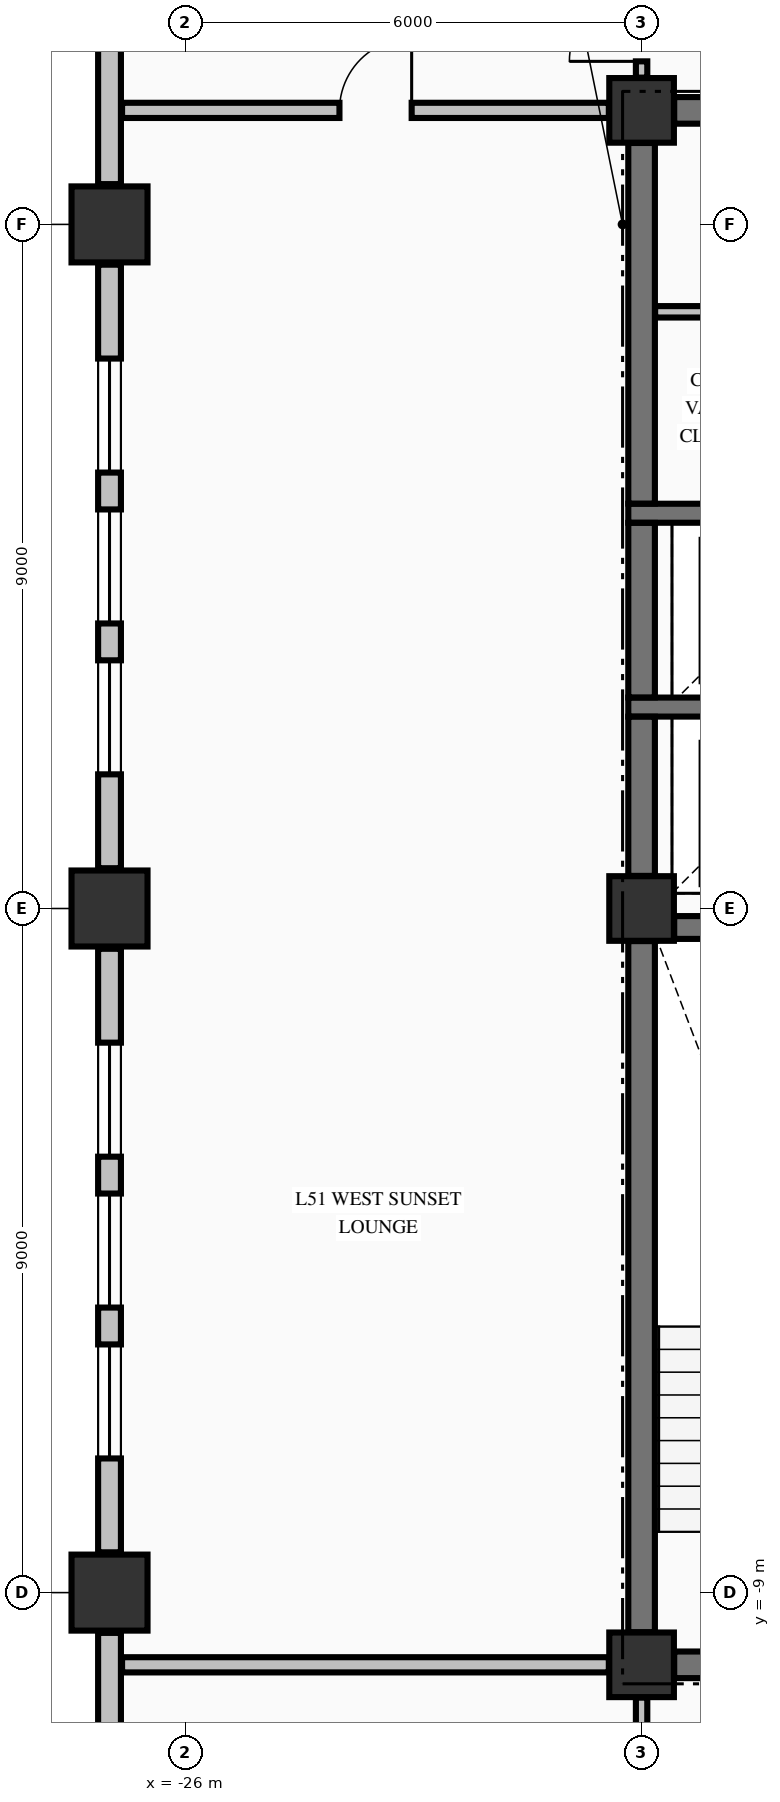
"""IFC4 building model, lengths in metres.
Left out: names, types, materials, properties, quantities, classifications, styles, units other than length and angle.
Written with IfcOpenShell. Run it as: python <this file> out.ifc"""

import sys

from ifc_helpers import new_model, si_unit, direction, frame, frame_2d, origin, origin_2d, place, context, subcontext, project, spatial, rectangle, extrude, element, fill, save


model = new_model("IFC4")
c1 = context("Model", 3, precision=1e-05, world=origin(), true_north=direction((0.0, 1.0)))
c2 = subcontext(c1, "Body", "Model", "MODEL_VIEW")
j1 = project(units=[si_unit("LENGTHUNIT", "METRE"), si_unit("PLANEANGLEUNIT", "RADIAN")], contexts=[c1])
p1 = place(None, origin())
s1 = spatial("IfcSite", under=j1, at=p1, CompositionType="ELEMENT")
p2 = place(p1, origin())
s2 = spatial("IfcBuilding", under=s1, at=p2, CompositionType="ELEMENT")
p3 = place(p2, frame((0.0, 0.0, 198.26)))
s3 = spatial("IfcBuildingStorey", under=s2, at=p3, CompositionType="ELEMENT", Elevation=198.26)
for number, where, z_axis, x_axis in (
    (1, (-27.0, -9.0, -0.25), (0.0, 0.0, 1.0), (1.0, 0.0, 0.0)),
    (2, (-27.0, 0.0, -0.25), (0.0, 0.0, 1.0), (1.0, 0.0, 0.0)),
    (3, (-27.0, 9.0, -0.25), (0.0, 0.0, 1.0), (1.0, 0.0, 0.0)),
):
    element("IfcColumn", number, at=place(p3, frame(where, z_axis=z_axis, x_axis=x_axis)), inside=s3, PredefinedType="COLUMN", context=c2, shape_type="SweptSolid", body=[
        extrude(rectangle(XDim=1.0, YDim=1.0, at=origin_2d()), origin(), (0.0, 0.0, 1.0), 3.4),
    ])
for number, where, z_axis, x_axis in (
    (4, (-20.0, -9.95, -0.25), (0.0, 0.0, 1.0), (1.0, 0.0, 0.0)),
    (5, (-20.0, 10.5, -0.25), (0.0, 0.0, 1.0), (1.0, 0.0, 0.0)),
    (6, (-20.0, 0.0, -0.25), (0.0, 0.0, 1.0), (1.0, 0.0, 0.0)),
):
    element("IfcColumn", number, at=place(p3, frame(where, z_axis=z_axis, x_axis=x_axis)), inside=s3, PredefinedType="COLUMN", context=c2, shape_type="SweptSolid", body=[
        extrude(rectangle(XDim=0.85, YDim=0.85, at=origin_2d()), origin(), (0.0, 0.0, 1.0), 3.4),
    ])
p4 = place(p3, frame((-27.0, -9.53, 0.0), z_axis=(0.0, 0.0, 1.0), x_axis=(0.0, -1.0, 0.0)))
e7 = element("IfcWall", 7, at=p4, inside=s3, PredefinedType="STANDARD", context=c2, shape_type="SweptSolid", body=[
    extrude(rectangle(XDim=9.44, YDim=0.3, at=frame_2d((4.72, 0.0))), origin(), (0.0, 0.0, 1.0), 2.542),
])
p5 = place(p3, frame((-27.0, -0.53, 0.0), z_axis=(0.0, 0.0, 1.0), x_axis=(0.0, -1.0, 0.0)))
e8 = element("IfcWall", 8, at=p5, inside=s3, PredefinedType="STANDARD", context=c2, shape_type="SweptSolid", body=[
    extrude(rectangle(XDim=7.94, YDim=0.3, at=frame_2d((3.97, 0.0))), origin(), (0.0, 0.0, 1.0), 2.542),
])
p6 = place(p5, frame((1.235, 0.0, 0.72)))
e9 = element("IfcOpeningElement", 9, at=p6, cuts=e8, PredefinedType="OPENING", context=c2, shape_type="SweptSolid", body=[
    extrude(rectangle(XDim=1.5, YDim=1.6, at=frame_2d((0.75, 0.8))), frame((0.0, 0.16, 0.0), z_axis=(0.0, -1.0, 0.0), x_axis=(1.0, 0.0, 0.0)), (0.0, 0.0, 1.0), 0.32),
])
p7 = place(p5, frame((3.22, 0.0, 0.72)))
e10 = element("IfcOpeningElement", 10, at=p7, cuts=e8, PredefinedType="OPENING", context=c2, shape_type="SweptSolid", body=[
    extrude(rectangle(XDim=1.5, YDim=1.6, at=frame_2d((0.75, 0.8))), frame((0.0, 0.16, 0.0), z_axis=(0.0, -1.0, 0.0), x_axis=(1.0, 0.0, 0.0)), (0.0, 0.0, 1.0), 0.32),
])
p8 = place(p5, frame((5.205, 0.0, 0.72)))
e11 = element("IfcOpeningElement", 11, at=p8, cuts=e8, PredefinedType="OPENING", context=c2, shape_type="SweptSolid", body=[
    extrude(rectangle(XDim=1.5, YDim=1.6, at=frame_2d((0.75, 0.8))), frame((0.0, 0.16, 0.0), z_axis=(0.0, -1.0, 0.0), x_axis=(1.0, 0.0, 0.0)), (0.0, 0.0, 1.0), 0.32),
])
p9 = place(p3, frame((-27.0, 8.47, 0.0), z_axis=(0.0, 0.0, 1.0), x_axis=(0.0, -1.0, 0.0)))
e12 = element("IfcWall", 12, at=p9, inside=s3, PredefinedType="STANDARD", context=c2, shape_type="SweptSolid", body=[
    extrude(rectangle(XDim=7.94, YDim=0.3, at=frame_2d((3.97, 0.0))), origin(), (0.0, 0.0, 1.0), 2.542),
])
p10 = place(p9, frame((1.235, 0.0, 0.72)))
e13 = element("IfcOpeningElement", 13, at=p10, cuts=e12, PredefinedType="OPENING", context=c2, shape_type="SweptSolid", body=[
    extrude(rectangle(XDim=1.5, YDim=1.6, at=frame_2d((0.75, 0.8))), frame((0.0, 0.16, 0.0), z_axis=(0.0, -1.0, 0.0), x_axis=(1.0, 0.0, 0.0)), (0.0, 0.0, 1.0), 0.32),
])
p11 = place(p9, frame((3.22, 0.0, 0.72)))
e14 = element("IfcOpeningElement", 14, at=p11, cuts=e12, PredefinedType="OPENING", context=c2, shape_type="SweptSolid", body=[
    extrude(rectangle(XDim=1.5, YDim=1.6, at=frame_2d((0.75, 0.8))), frame((0.0, 0.16, 0.0), z_axis=(0.0, -1.0, 0.0), x_axis=(1.0, 0.0, 0.0)), (0.0, 0.0, 1.0), 0.32),
])
p12 = place(p9, frame((5.205, 0.0, 0.72)))
e15 = element("IfcOpeningElement", 15, at=p12, cuts=e12, PredefinedType="OPENING", context=c2, shape_type="SweptSolid", body=[
    extrude(rectangle(XDim=1.5, YDim=1.6, at=frame_2d((0.75, 0.8))), frame((0.0, 0.16, 0.0), z_axis=(0.0, -1.0, 0.0), x_axis=(1.0, 0.0, 0.0)), (0.0, 0.0, 1.0), 0.32),
])
p13 = place(p3, frame((-27.0, 18.97, 0.0), z_axis=(0.0, 0.0, 1.0), x_axis=(0.0, -1.0, 0.0)))
e16 = element("IfcWall", 16, at=p13, inside=s3, PredefinedType="STANDARD", context=c2, shape_type="SweptSolid", body=[
    extrude(rectangle(XDim=9.44, YDim=0.3, at=frame_2d((4.72, 0.0))), origin(), (0.0, 0.0, 1.0), 2.542),
])
p14 = place(p3, frame((-19.571, -9.95, 0.0), z_axis=(0.0, 0.0, 1.0), x_axis=(1.0, 0.0, 0.0)))
e17 = element("IfcWall", 17, at=p14, inside=s3, PredefinedType="SHEAR", context=c2, shape_type="SweptSolid", body=[
    extrude(rectangle(XDim=4.871, YDim=0.35, at=frame_2d((2.436, 0.0))), origin(), (0.0, 0.0, 1.0), 3.15),
])
p15 = place(p14, frame((0.746, 0.0, 0.0)))
e18 = element("IfcOpeningElement", 18, at=p15, cuts=e17, PredefinedType="OPENING", context=c2, shape_type="SweptSolid", body=[
    extrude(rectangle(XDim=1.05, YDim=2.15, at=frame_2d((0.525, 1.075))), frame((0.0, 0.185, 0.0), z_axis=(0.0, -1.0, 0.0), x_axis=(1.0, 0.0, 0.0)), (0.0, 0.0, 1.0), 0.37),
])
p16 = place(p3, frame((-19.571, -0.25, 0.0), z_axis=(0.0, 0.0, 1.0), x_axis=(1.0, 0.0, 0.0)))
e19 = element("IfcWall", 19, at=p16, inside=s3, PredefinedType="SHEAR", context=c2, shape_type="SweptSolid", body=[
    extrude(rectangle(XDim=8.142, YDim=0.3, at=frame_2d((4.071, 0.0))), origin(), (0.0, 0.0, 1.0), 3.15),
])
p17 = place(p16, frame((5.871, 0.0, 0.0)))
e20 = element("IfcOpeningElement", 20, at=p17, cuts=e19, PredefinedType="OPENING", context=c2, shape_type="SweptSolid", body=[
    extrude(rectangle(XDim=1.1, YDim=2.15, at=frame_2d((0.55, 1.075))), frame((0.0, 0.16, 0.0), z_axis=(0.0, -1.0, 0.0), x_axis=(1.0, 0.0, 0.0)), (0.0, 0.0, 1.0), 0.32),
])
for number, where, z_axis, x_axis in (
    (21, (-20.175, 2.65, 0.0), (0.0, 0.0, 1.0), (1.0, 0.0, 0.0)),
    (22, (-20.175, 5.2, 0.0), (0.0, 0.0, 1.0), (1.0, 0.0, 0.0)),
):
    element("IfcWall", number, at=place(p3, frame(where, z_axis=z_axis, x_axis=x_axis)), inside=s3, PredefinedType="SOLIDWALL", context=c2, shape_type="SweptSolid", body=[
        extrude(rectangle(XDim=3.2, YDim=0.25, at=frame_2d((1.6, 0.0))), origin(), (0.0, 0.0, 1.0), 3.15),
    ])
p18 = place(p3, frame((-19.571, 10.5, 0.0), z_axis=(0.0, 0.0, 1.0), x_axis=(1.0, 0.0, 0.0)))
e23 = element("IfcWall", 23, at=p18, inside=s3, PredefinedType="SHEAR", context=c2, shape_type="SweptSolid", body=[
    extrude(rectangle(XDim=4.871, YDim=0.35, at=frame_2d((2.436, 0.0))), origin(), (0.0, 0.0, 1.0), 3.15),
])
p19 = place(p18, frame((3.121, 0.0, 0.0)))
e24 = element("IfcOpeningElement", 24, at=p19, cuts=e23, PredefinedType="OPENING", context=c2, shape_type="SweptSolid", body=[
    extrude(rectangle(XDim=1.1, YDim=2.15, at=frame_2d((0.55, 1.075))), frame((0.0, 0.185, 0.0), z_axis=(0.0, -1.0, 0.0), x_axis=(1.0, 0.0, 0.0)), (0.0, 0.0, 1.0), 0.37),
])
p20 = place(p3, frame((-26.835, -9.95, 0.0), z_axis=(0.0, 0.0, 1.0), x_axis=(1.0, 0.0, 0.0)))
e25 = element("IfcWall", 25, at=p20, inside=s3, PredefinedType="PARTITIONING", context=c2, shape_type="SweptSolid", body=[
    extrude(rectangle(XDim=6.404, YDim=0.2, at=frame_2d((3.202, 0.0))), origin(), (0.0, 0.0, 1.0), 3.15),
])
p21 = place(p3, frame((-19.822, 7.85, 0.0), z_axis=(0.0, 0.0, 1.0), x_axis=(1.0, 0.0, 0.0)))
e26 = element("IfcWall", 26, at=p21, inside=s3, PredefinedType="PARTITIONING", context=c2, shape_type="SweptSolid", body=[
    extrude(rectangle(XDim=2.822, YDim=0.15, at=frame_2d((1.411, 0.0))), origin(), (0.0, 0.0, 1.0), 3.15),
])
p22 = place(p3, frame((-26.835, 10.5, 0.0), z_axis=(0.0, 0.0, 1.0), x_axis=(1.0, 0.0, 0.0)))
e27 = element("IfcWall", 27, at=p22, inside=s3, PredefinedType="PARTITIONING", context=c2, shape_type="SweptSolid", body=[
    extrude(rectangle(XDim=6.404, YDim=0.2, at=frame_2d((3.202, 0.0))), origin(), (0.0, 0.0, 1.0), 3.15),
])
p23 = place(p22, frame((2.86, 0.0, 0.0)))
e28 = element("IfcOpeningElement", 28, at=p23, cuts=e27, PredefinedType="OPENING", context=c2, shape_type="SweptSolid", body=[
    extrude(rectangle(XDim=0.95, YDim=2.15, at=frame_2d((0.475, 1.075))), frame((0.0, 0.11, 0.0), z_axis=(0.0, -1.0, 0.0), x_axis=(1.0, 0.0, 0.0)), (0.0, 0.0, 1.0), 0.22),
])
p24 = place(p3, frame((-20.0, -9.521, 0.0), z_axis=(0.0, 0.0, 1.0), x_axis=(0.0, 1.0, 0.0)))
e29 = element("IfcWall", 29, at=p24, inside=s3, PredefinedType="SHEAR", context=c2, shape_type="SweptSolid", body=[
    extrude(rectangle(XDim=9.092, YDim=0.35, at=frame_2d((4.546, 0.0))), origin(), (0.0, 0.0, 1.0), 3.15),
])
p25 = place(p3, frame((-20.0, 0.429, 0.0), z_axis=(0.0, 0.0, 1.0), x_axis=(0.0, 1.0, 0.0)))
e30 = element("IfcWall", 30, at=p25, inside=s3, PredefinedType="SHEAR", context=c2, shape_type="SweptSolid", body=[
    extrude(rectangle(XDim=2.094, YDim=0.35, at=frame_2d((1.047, 0.0))), origin(), (0.0, 0.0, 1.0), 3.15),
])
p26 = place(p3, frame((-20.0, 2.777, 0.0), z_axis=(0.0, 0.0, 1.0), x_axis=(0.0, 1.0, 0.0)))
e31 = element("IfcWall", 31, at=p26, inside=s3, PredefinedType="SHEAR", context=c2, shape_type="SweptSolid", body=[
    extrude(rectangle(XDim=2.296, YDim=0.35, at=frame_2d((1.148, 0.0))), origin(), (0.0, 0.0, 1.0), 3.15),
])
p27 = place(p3, frame((-20.0, 5.327, 0.0), z_axis=(0.0, 0.0, 1.0), x_axis=(0.0, 1.0, 0.0)))
e32 = element("IfcWall", 32, at=p27, inside=s3, PredefinedType="SHEAR", context=c2, shape_type="SweptSolid", body=[
    extrude(rectangle(XDim=4.744, YDim=0.35, at=frame_2d((2.372, 0.0))), origin(), (0.0, 0.0, 1.0), 3.15),
])
p28 = place(p3, frame((-20.0, -12.447, 0.0), z_axis=(0.0, 0.0, 1.0), x_axis=(0.0, 1.0, 0.0)))
e33 = element("IfcWall", 33, at=p28, inside=s3, PredefinedType="PARTITIONING", context=c2, shape_type="SweptSolid", body=[
    extrude(rectangle(XDim=2.066, YDim=0.15, at=frame_2d((1.033, 0.0))), origin(), (0.0, 0.0, 1.0), 2.342),
])
p29 = place(p3, frame((-20.0, 10.931, 0.0), z_axis=(0.0, 0.0, 1.0), x_axis=(0.0, 1.0, 0.0)))
e34 = element("IfcWall", 34, at=p29, inside=s3, PredefinedType="PARTITIONING", context=c2, shape_type="SweptSolid", body=[
    extrude(rectangle(XDim=1.716, YDim=0.15, at=frame_2d((0.858, 0.0))), origin(), (0.0, 0.0, 1.0), 2.342),
])
p30 = place(p29, frame((0.214, 0.0, 0.0)))
e35 = element("IfcOpeningElement", 35, at=p30, cuts=e34, PredefinedType="OPENING", context=c2, shape_type="SweptSolid", body=[
    extrude(rectangle(XDim=0.95, YDim=2.15, at=frame_2d((0.475, 1.075))), frame((0.0, 0.085, 0.0), z_axis=(0.0, -1.0, 0.0), x_axis=(1.0, 0.0, 0.0)), (0.0, 0.0, 1.0), 0.17),
])
p31 = place(p6, origin())
e36 = element("IfcWindow", 36, at=p31, inside=s3, PartitioningType="SINGLE_PANEL", PredefinedType="WINDOW", context=c2, shape_type="SweptSolid", body=[
    extrude(rectangle(XDim=1.5, YDim=1.6, at=frame_2d((0.75, 0.8))), frame((0.0, 0.03, 0.0), z_axis=(0.0, -1.0, 0.0), x_axis=(1.0, 0.0, 0.0)), (0.0, 0.0, 1.0), 0.06),
])
fill(e9, e36)
p32 = place(p7, origin())
e37 = element("IfcWindow", 37, at=p32, inside=s3, PartitioningType="SINGLE_PANEL", PredefinedType="WINDOW", context=c2, shape_type="SweptSolid", body=[
    extrude(rectangle(XDim=1.5, YDim=1.6, at=frame_2d((0.75, 0.8))), frame((0.0, 0.03, 0.0), z_axis=(0.0, -1.0, 0.0), x_axis=(1.0, 0.0, 0.0)), (0.0, 0.0, 1.0), 0.06),
])
fill(e10, e37)
p33 = place(p8, origin())
e38 = element("IfcWindow", 38, at=p33, inside=s3, PartitioningType="SINGLE_PANEL", PredefinedType="WINDOW", context=c2, shape_type="SweptSolid", body=[
    extrude(rectangle(XDim=1.5, YDim=1.6, at=frame_2d((0.75, 0.8))), frame((0.0, 0.03, 0.0), z_axis=(0.0, -1.0, 0.0), x_axis=(1.0, 0.0, 0.0)), (0.0, 0.0, 1.0), 0.06),
])
fill(e11, e38)
p34 = place(p10, origin())
e39 = element("IfcWindow", 39, at=p34, inside=s3, PartitioningType="SINGLE_PANEL", PredefinedType="WINDOW", context=c2, shape_type="SweptSolid", body=[
    extrude(rectangle(XDim=1.5, YDim=1.6, at=frame_2d((0.75, 0.8))), frame((0.0, 0.03, 0.0), z_axis=(0.0, -1.0, 0.0), x_axis=(1.0, 0.0, 0.0)), (0.0, 0.0, 1.0), 0.06),
])
fill(e13, e39)
p35 = place(p11, origin())
e40 = element("IfcWindow", 40, at=p35, inside=s3, PartitioningType="SINGLE_PANEL", PredefinedType="WINDOW", context=c2, shape_type="SweptSolid", body=[
    extrude(rectangle(XDim=1.5, YDim=1.6, at=frame_2d((0.75, 0.8))), frame((0.0, 0.03, 0.0), z_axis=(0.0, -1.0, 0.0), x_axis=(1.0, 0.0, 0.0)), (0.0, 0.0, 1.0), 0.06),
])
fill(e14, e40)
p36 = place(p12, origin())
e41 = element("IfcWindow", 41, at=p36, inside=s3, PartitioningType="SINGLE_PANEL", PredefinedType="WINDOW", context=c2, shape_type="SweptSolid", body=[
    extrude(rectangle(XDim=1.5, YDim=1.6, at=frame_2d((0.75, 0.8))), frame((0.0, 0.03, 0.0), z_axis=(0.0, -1.0, 0.0), x_axis=(1.0, 0.0, 0.0)), (0.0, 0.0, 1.0), 0.06),
])
fill(e15, e41)
p37 = place(p30, origin())
e42 = element("IfcDoor", 42, at=p37, inside=s3, OperationType="SINGLE_SWING_LEFT", PredefinedType="DOOR", context=c2, shape_type="SweptSolid", body=[
    extrude(rectangle(XDim=0.95, YDim=2.15, at=frame_2d((0.475, 1.075))), frame((0.0, 0.025, 0.0), z_axis=(0.0, -1.0, 0.0), x_axis=(1.0, 0.0, 0.0)), (0.0, 0.0, 1.0), 0.05),
])
fill(e35, e42)
p38 = place(p23, origin())
e43 = element("IfcDoor", 43, at=p38, inside=s3, OperationType="SINGLE_SWING_RIGHT", PredefinedType="DOOR", context=c2, shape_type="SweptSolid", body=[
    extrude(rectangle(XDim=0.95, YDim=2.15, at=frame_2d((0.475, 1.075))), frame((0.0, 0.025, 0.0), z_axis=(0.0, -1.0, 0.0), x_axis=(1.0, 0.0, 0.0)), (0.0, 0.0, 1.0), 0.05),
])
fill(e28, e43)
save(model, sys.argv[1])
